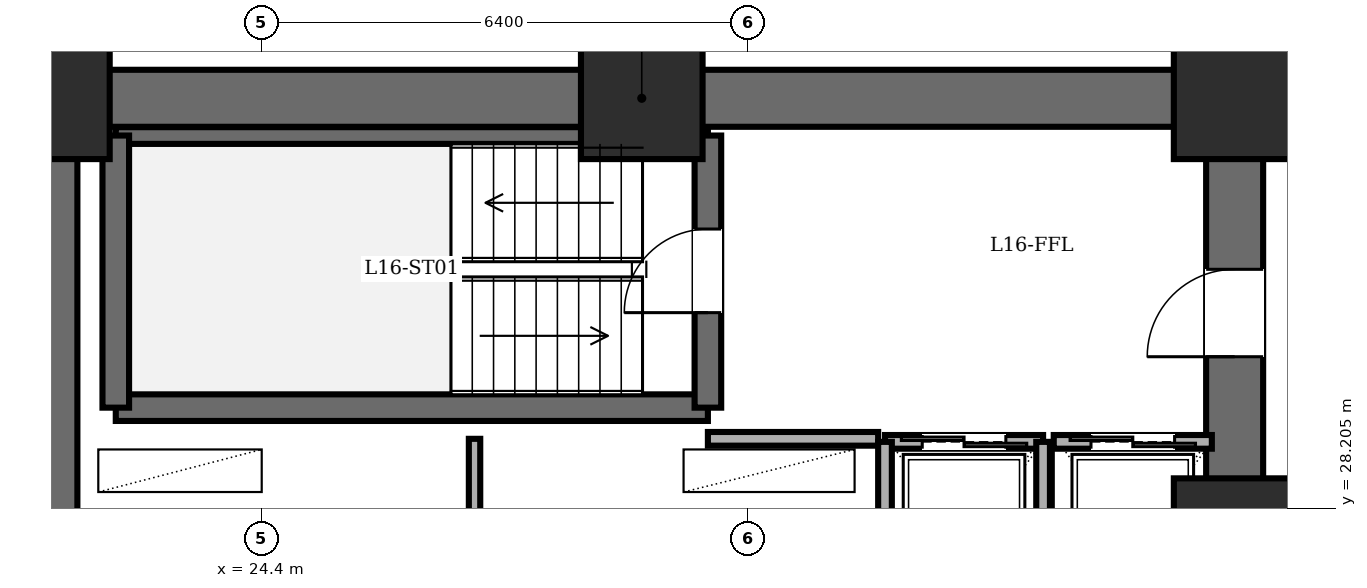
"""IFC4 building model, lengths in metres.
Left out: names, types, materials, properties, quantities, classifications, styles, units other than length and angle.
Written with IfcOpenShell. Run it as: python <this file> out.ifc"""

import sys

from ifc_helpers import new_model, si_unit, direction, frame, frame_2d, origin, origin_2d, place, context, subcontext, project, spatial, rectangle, extrude, element, fill, save


model = new_model("IFC4")
c1 = context("Model", 3, precision=1e-05, world=origin(), true_north=direction((0.0, 1.0)))
c2 = subcontext(c1, "Body", "Model", "MODEL_VIEW")
j1 = project(units=[si_unit("LENGTHUNIT", "METRE"), si_unit("PLANEANGLEUNIT", "RADIAN")], contexts=[c1])
p1 = place(None, origin())
s1 = spatial("IfcSite", under=j1, at=p1, CompositionType="ELEMENT")
p2 = place(p1, origin())
s2 = spatial("IfcBuilding", under=s1, at=p2, CompositionType="ELEMENT")
p3 = place(p2, frame((0.0, 0.0, 61.2)))
s3 = spatial("IfcBuildingStorey", under=s2, at=p3, CompositionType="ELEMENT", Elevation=61.2)
for number, where, z_axis, x_axis in (
    (1, (37.2, 27.8, 0.0), (0.0, 0.0, 1.0), (1.0, 0.0, 0.0)),
    (2, (37.2, 33.6, 0.0), (0.0, 0.0, 1.0), (1.0, 0.0, 0.0)),
    (3, (29.4, 33.6, 0.0), (0.0, 0.0, 1.0), (1.0, 0.0, 0.0)),
    (4, (21.6, 33.6, 0.0), (0.0, 0.0, 1.0), (1.0, 0.0, 0.0)),
):
    element("IfcColumn", number, at=place(p3, frame(where, z_axis=z_axis, x_axis=x_axis)), inside=s3, PredefinedType="COLUMN", context=c2, shape_type="SweptSolid", body=[
        extrude(rectangle(XDim=1.6, YDim=1.6, at=origin_2d()), origin(), (0.0, 0.0, 1.0), 3.6),
    ])
p4 = place(p3, frame((21.6, 14.4, 0.0), z_axis=(0.0, 0.0, 1.0), x_axis=(0.0, 1.0, 0.0)))
e5 = element("IfcWall", 5, at=p4, inside=s3, PredefinedType="SHEAR", context=c2, shape_type="SweptSolid", body=[
    extrude(rectangle(XDim=19.2, YDim=0.75, at=frame_2d((9.6, 0.0))), origin(), (0.0, 0.0, 1.0), 3.4),
])
p5 = place(p3, frame((21.6, 33.6, 0.0), z_axis=(0.0, 0.0, 1.0), x_axis=(1.0, 0.0, 0.0)))
e6 = element("IfcWall", 6, at=p5, inside=s3, PredefinedType="SHEAR", context=c2, shape_type="SweptSolid", body=[
    extrude(rectangle(XDim=15.6, YDim=0.75, at=frame_2d((7.8, 0.0))), origin(), (0.0, 0.0, 1.0), 3.4),
])
p6 = place(p3, frame((37.2, 14.4, 0.0), z_axis=(0.0, 0.0, 1.0), x_axis=(0.0, 1.0, 0.0)))
e7 = element("IfcWall", 7, at=p6, inside=s3, PredefinedType="SHEAR", context=c2, shape_type="SweptSolid", body=[
    extrude(rectangle(XDim=19.2, YDim=0.75, at=frame_2d((9.6, 0.0))), origin(), (0.0, 0.0, 1.0), 3.4),
])
p7 = place(p6, frame((15.8, 0.0, 0.0)))
e8 = element("IfcOpeningElement", 8, at=p7, cuts=e7, PredefinedType="OPENING", context=c2, shape_type="SweptSolid", body=[
    extrude(rectangle(XDim=1.15, YDim=2.15, at=frame_2d((0.575, 1.075))), frame((0.0, 0.385, 0.0), z_axis=(0.0, -1.0, 0.0), x_axis=(1.0, 0.0, 0.0)), (0.0, 0.0, 1.0), 0.77),
])
p8 = place(p6, frame((3.6, 0.0, 0.0)))
e9 = element("IfcOpeningElement", 9, at=p8, cuts=e7, PredefinedType="OPENING", context=c2, shape_type="SweptSolid", body=[
    extrude(rectangle(XDim=1.1, YDim=2.15, at=frame_2d((0.55, 1.075))), frame((0.0, 0.385, 0.0), z_axis=(0.0, -1.0, 0.0), x_axis=(1.0, 0.0, 0.0)), (0.0, 0.0, 1.0), 0.77),
])
p9 = place(p6, frame((8.6, 0.0, 0.0)))
e10 = element("IfcOpeningElement", 10, at=p9, cuts=e7, PredefinedType="OPENING", context=c2, shape_type="SweptSolid", body=[
    extrude(rectangle(XDim=1.3, YDim=2.2, at=frame_2d((0.65, 1.1))), frame((0.0, 0.385, 0.0), z_axis=(0.0, -1.0, 0.0), x_axis=(1.0, 0.0, 0.0)), (0.0, 0.0, 1.0), 0.77),
])
p10 = place(p3, frame((22.48, 29.53, 0.0), z_axis=(0.0, 0.0, 1.0), x_axis=(1.0, 0.0, 0.0)))
e11 = element("IfcWall", 11, at=p10, inside=s3, PredefinedType="SOLIDWALL", context=c2, shape_type="SweptSolid", body=[
    extrude(rectangle(XDim=7.79, YDim=0.35, at=frame_2d((3.895, 0.0))), origin(), (0.0, 0.0, 1.0), 3.4),
])
p11 = place(p3, frame((22.48, 33.11, 0.0), z_axis=(0.0, 0.0, 1.0), x_axis=(1.0, 0.0, 0.0)))
e12 = element("IfcWall", 12, at=p11, inside=s3, PredefinedType="PARTITIONING", context=c2, shape_type="SweptSolid", body=[
    extrude(rectangle(XDim=7.79, YDim=0.22, at=frame_2d((3.895, 0.0))), origin(), (0.0, 0.0, 1.0), 3.4),
])
p12 = place(p3, frame((22.48, 29.53, 0.0), z_axis=(0.0, 0.0, 1.0), x_axis=(0.0, 1.0, 0.0)))
e13 = element("IfcWall", 13, at=p12, inside=s3, PredefinedType="SOLIDWALL", context=c2, shape_type="SweptSolid", body=[
    extrude(rectangle(XDim=3.58, YDim=0.35, at=frame_2d((1.79, 0.0))), origin(), (0.0, 0.0, 1.0), 3.4),
])
p13 = place(p3, frame((30.27, 29.53, 0.0), z_axis=(0.0, 0.0, 1.0), x_axis=(0.0, 1.0, 0.0)))
e14 = element("IfcWall", 14, at=p13, inside=s3, PredefinedType="SOLIDWALL", context=c2, shape_type="SweptSolid", body=[
    extrude(rectangle(XDim=3.58, YDim=0.35, at=frame_2d((1.79, 0.0))), origin(), (0.0, 0.0, 1.0), 3.4),
])
p14 = place(p13, frame((1.25, 0.0, 0.0)))
e15 = element("IfcOpeningElement", 15, at=p14, cuts=e14, PredefinedType="OPENING", context=c2, shape_type="SweptSolid", body=[
    extrude(rectangle(XDim=1.1, YDim=2.15, at=frame_2d((0.55, 1.075))), frame((0.0, 0.185, 0.0), z_axis=(0.0, -1.0, 0.0), x_axis=(1.0, 0.0, 0.0)), (0.0, 0.0, 1.0), 0.37),
])
p15 = place(p3, frame((30.27, 29.12, 0.0), z_axis=(0.0, 0.0, 1.0), x_axis=(1.0, 0.0, 0.0)))
e16 = element("IfcWall", 16, at=p15, inside=s3, PredefinedType="PARTITIONING", context=c2, shape_type="SweptSolid", body=[
    extrude(rectangle(XDim=2.24, YDim=0.18, at=frame_2d((1.12, 0.0))), origin(), (0.0, 0.0, 1.0), 3.4),
])
p16 = place(p3, frame((27.2, 27.6, 0.0), z_axis=(0.0, 0.0, 1.0), x_axis=(0.0, 1.0, 0.0)))
e17 = element("IfcWall", 17, at=p16, inside=s3, PredefinedType="PARTITIONING", context=c2, shape_type="SweptSolid", body=[
    extrude(rectangle(XDim=1.52, YDim=0.15, at=frame_2d((0.76, 0.0))), origin(), (0.0, 0.0, 1.0), 3.4),
])
p17 = place(p3, frame((32.6, 29.08, 0.0), z_axis=(0.0, 0.0, 1.0), x_axis=(1.0, 0.0, 0.0)))
e18 = element("IfcWall", 18, at=p17, inside=s3, PredefinedType="PARTITIONING", context=c2, shape_type="SweptSolid", body=[
    extrude(rectangle(XDim=2.08, YDim=0.18, at=frame_2d((1.04, 0.0))), origin(), (0.0, 0.0, 1.0), 3.4),
])
p18 = place(p17, frame((0.49, 0.0, 0.0)))
e19 = element("IfcOpeningElement", 19, at=p18, cuts=e18, PredefinedType="OPENING", context=c2, shape_type="SweptSolid", body=[
    extrude(rectangle(XDim=1.1, YDim=2.2, at=frame_2d((0.55, 1.1))), frame((0.0, 0.1, 0.0), z_axis=(0.0, -1.0, 0.0), x_axis=(1.0, 0.0, 0.0)), (0.0, 0.0, 1.0), 0.2),
])
for number, where, z_axis, x_axis in (
    (20, (34.68, 26.35, 0.0), (0.0, 0.0, 1.0), (0.0, 1.0, 0.0)),
    (21, (32.6, 29.08, 0.0), (0.0, 0.0, 1.0), (0.0, -1.0, 0.0)),
):
    element("IfcWall", number, at=place(p3, frame(where, z_axis=z_axis, x_axis=x_axis)), inside=s3, PredefinedType="PARTITIONING", context=c2, shape_type="SweptSolid", body=[
        extrude(rectangle(XDim=2.73, YDim=0.18, at=frame_2d((1.365, 0.0))), origin(), (0.0, 0.0, 1.0), 3.4),
    ])
p19 = place(p3, frame((34.82, 29.08, 0.0), z_axis=(0.0, 0.0, 1.0), x_axis=(1.0, 0.0, 0.0)))
e22 = element("IfcWall", 22, at=p19, inside=s3, PredefinedType="PARTITIONING", context=c2, shape_type="SweptSolid", body=[
    extrude(rectangle(XDim=2.08, YDim=0.18, at=frame_2d((1.04, 0.0))), origin(), (0.0, 0.0, 1.0), 3.4),
])
p20 = place(p19, frame((0.49, 0.0, 0.0)))
e23 = element("IfcOpeningElement", 23, at=p20, cuts=e22, PredefinedType="OPENING", context=c2, shape_type="SweptSolid", body=[
    extrude(rectangle(XDim=1.1, YDim=2.2, at=frame_2d((0.55, 1.1))), frame((0.0, 0.1, 0.0), z_axis=(0.0, -1.0, 0.0), x_axis=(1.0, 0.0, 0.0)), (0.0, 0.0, 1.0), 0.2),
])
p21 = place(p14, origin())
e24 = element("IfcDoor", 24, at=p21, inside=s3, OperationType="SINGLE_SWING_LEFT", PredefinedType="DOOR", context=c2, shape_type="SweptSolid", body=[
    extrude(rectangle(XDim=1.1, YDim=2.15, at=frame_2d((0.55, 1.075))), frame((0.0, 0.025, 0.0), z_axis=(0.0, -1.0, 0.0), x_axis=(1.0, 0.0, 0.0)), (0.0, 0.0, 1.0), 0.05),
])
fill(e15, e24)
p22 = place(p7, origin())
e25 = element("IfcDoor", 25, at=p22, inside=s3, OperationType="SINGLE_SWING_LEFT", PredefinedType="DOOR", context=c2, shape_type="SweptSolid", body=[
    extrude(rectangle(XDim=1.15, YDim=2.15, at=frame_2d((0.575, 1.075))), frame((0.0, 0.025, 0.0), z_axis=(0.0, -1.0, 0.0), x_axis=(1.0, 0.0, 0.0)), (0.0, 0.0, 1.0), 0.05),
])
fill(e8, e25)
p23 = place(p18, origin())
e26 = element("IfcDoor", 26, at=p23, inside=s3, OperationType="DOUBLE_DOOR_SLIDING", PredefinedType="DOOR", context=c2, shape_type="SweptSolid", body=[
    extrude(rectangle(XDim=1.1, YDim=2.2, at=frame_2d((0.55, 1.1))), frame((0.0, 0.025, 0.0), z_axis=(0.0, -1.0, 0.0), x_axis=(1.0, 0.0, 0.0)), (0.0, 0.0, 1.0), 0.05),
])
fill(e19, e26)
p24 = place(p20, origin())
e27 = element("IfcDoor", 27, at=p24, inside=s3, OperationType="DOUBLE_DOOR_SLIDING", PredefinedType="DOOR", context=c2, shape_type="SweptSolid", body=[
    extrude(rectangle(XDim=1.1, YDim=2.2, at=frame_2d((0.55, 1.1))), frame((0.0, 0.025, 0.0), z_axis=(0.0, -1.0, 0.0), x_axis=(1.0, 0.0, 0.0)), (0.0, 0.0, 1.0), 0.05),
])
fill(e23, e27)
save(model, sys.argv[1])
